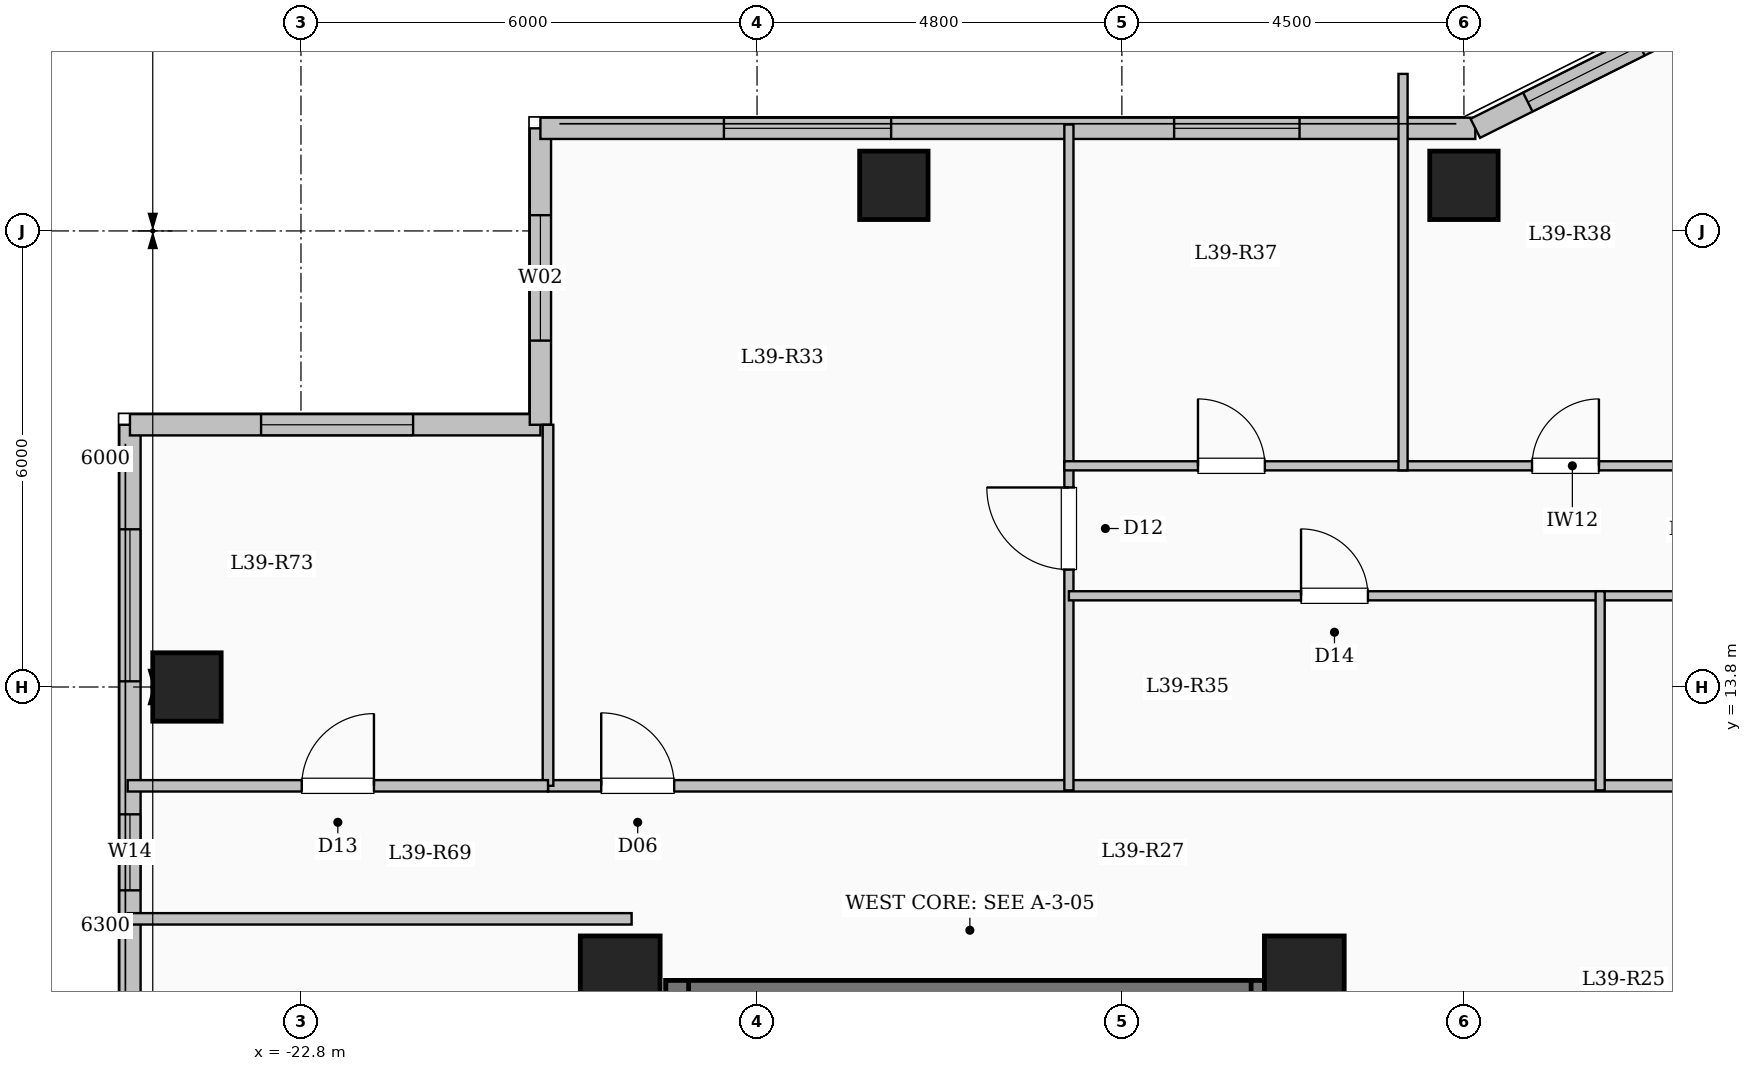
"""IFC4 building model, lengths in metres.
Left out: names, types, materials, properties, quantities, classifications, styles, units other than length and angle.
Written with IfcOpenShell. Run it as: python <this file> out.ifc"""

import sys

from ifc_helpers import new_model, si_unit, direction, frame, frame_2d, origin, origin_2d, place, context, subcontext, project, spatial, rectangle, extrude, element, fill, save


model = new_model("IFC4")
c1 = context("Model", 3, precision=1e-05, world=origin(), true_north=direction((0.0, 1.0)))
c2 = subcontext(c1, "Body", "Model", "MODEL_VIEW")
j1 = project(units=[si_unit("LENGTHUNIT", "METRE"), si_unit("PLANEANGLEUNIT", "RADIAN")], contexts=[c1])
p1 = place(None, origin())
s1 = spatial("IfcSite", under=j1, at=p1, CompositionType="ELEMENT")
p2 = place(p1, origin())
s2 = spatial("IfcBuilding", under=s1, at=p2, CompositionType="ELEMENT")
p3 = place(p2, frame((0.0, 0.0, 146.0)))
s3 = spatial("IfcBuildingStorey", under=s2, at=p3, CompositionType="ELEMENT", Elevation=146.0)
for number, where, z_axis, x_axis in (
    (1, (-9.6, 10.0, 0.0), (0.0, 0.0, 1.0), (1.0, 0.0, 0.0)),
    (2, (-18.6, 10.0, 0.0), (0.0, 0.0, 1.0), (1.0, 0.0, 0.0)),
):
    element("IfcColumn", number, at=place(p3, frame(where, z_axis=z_axis, x_axis=x_axis)), inside=s3, PredefinedType="COLUMN", context=c2, shape_type="SweptSolid", body=[
        extrude(rectangle(XDim=1.05, YDim=1.05, at=origin_2d()), origin(), (0.0, 0.0, 1.0), 3.35),
    ])
for number, where, z_axis, x_axis in (
    (3, (-15.0, 20.4, 0.0), (0.0, 0.0, 1.0), (1.0, 0.0, 0.0)),
    (4, (-7.5, 20.4, 0.0), (0.0, 0.0, 1.0), (1.0, 0.0, 0.0)),
    (5, (-24.3, 13.8, 0.0), (0.0, 0.0, 1.0), (1.0, 0.0, 0.0)),
):
    element("IfcColumn", number, at=place(p3, frame(where, z_axis=z_axis, x_axis=x_axis)), inside=s3, PredefinedType="COLUMN", context=c2, shape_type="SweptSolid", body=[
        extrude(rectangle(XDim=0.9, YDim=0.9, at=origin_2d()), origin(), (0.0, 0.0, 1.0), 3.35),
    ])
p4 = place(p3, frame((-25.05, -17.25, 0.0), z_axis=(0.0, 0.0, 1.0), x_axis=(0.0, 1.0, 0.0)))
e6 = element("IfcWall", 6, at=p4, inside=s3, PredefinedType="SOLIDWALL", context=c2, shape_type="SweptSolid", body=[
    extrude(rectangle(XDim=34.5, YDim=0.28, at=frame_2d((17.25, 0.0))), origin(), (0.0, 0.0, 1.0), 3.1),
])
p5 = place(p4, frame((2.35, 0.0, 0.9)))
e7 = element("IfcOpeningElement", 7, at=p5, cuts=e6, PredefinedType="OPENING", context=c2, shape_type="SweptSolid", body=[
    extrude(rectangle(XDim=2.2, YDim=1.75, at=frame_2d((1.1, 0.875))), frame((0.0, 0.15, 0.0), z_axis=(0.0, -1.0, 0.0), x_axis=(1.0, 0.0, 0.0)), (0.0, 0.0, 1.0), 0.3),
])
p6 = place(p4, frame((7.742, 0.0, 0.9)))
e8 = element("IfcOpeningElement", 8, at=p6, cuts=e6, PredefinedType="OPENING", context=c2, shape_type="SweptSolid", body=[
    extrude(rectangle(XDim=1.5, YDim=1.65, at=frame_2d((0.75, 0.825))), frame((0.0, 0.15, 0.0), z_axis=(0.0, -1.0, 0.0), x_axis=(1.0, 0.0, 0.0)), (0.0, 0.0, 1.0), 0.3),
])
p7 = place(p4, frame((18.0, 0.0, 0.9)))
e9 = element("IfcOpeningElement", 9, at=p7, cuts=e6, PredefinedType="OPENING", context=c2, shape_type="SweptSolid", body=[
    extrude(rectangle(XDim=2.0, YDim=1.7, at=frame_2d((1.0, 0.85))), frame((0.0, 0.15, 0.0), z_axis=(0.0, -1.0, 0.0), x_axis=(1.0, 0.0, 0.0)), (0.0, 0.0, 1.0), 0.3),
])
p8 = place(p4, frame((28.375, 0.0, 0.95)))
e10 = element("IfcOpeningElement", 10, at=p8, cuts=e6, PredefinedType="OPENING", context=c2, shape_type="SweptSolid", body=[
    extrude(rectangle(XDim=1.0, YDim=1.5, at=frame_2d((0.5, 0.75))), frame((0.0, 0.15, 0.0), z_axis=(0.0, -1.0, 0.0), x_axis=(1.0, 0.0, 0.0)), (0.0, 0.0, 1.0), 0.3),
])
p9 = place(p4, frame((31.125, 0.0, 0.9)))
e11 = element("IfcOpeningElement", 11, at=p9, cuts=e6, PredefinedType="OPENING", context=c2, shape_type="SweptSolid", body=[
    extrude(rectangle(XDim=2.0, YDim=1.7, at=frame_2d((1.0, 0.85))), frame((0.0, 0.15, 0.0), z_axis=(0.0, -1.0, 0.0), x_axis=(1.0, 0.0, 0.0)), (0.0, 0.0, 1.0), 0.3),
])
p10 = place(p3, frame((-25.05, 17.25, 0.0), z_axis=(0.0, 0.0, 1.0), x_axis=(1.0, 0.0, 0.0)))
e12 = element("IfcWall", 12, at=p10, inside=s3, PredefinedType="SOLIDWALL", context=c2, shape_type="SweptSolid", body=[
    extrude(rectangle(XDim=5.4, YDim=0.28, at=frame_2d((2.7, 0.0))), origin(), (0.0, 0.0, 1.0), 3.1),
])
p11 = place(p10, frame((1.725, 0.0, 0.9)))
e13 = element("IfcOpeningElement", 13, at=p11, cuts=e12, PredefinedType="OPENING", context=c2, shape_type="SweptSolid", body=[
    extrude(rectangle(XDim=2.0, YDim=1.7, at=frame_2d((1.0, 0.85))), frame((0.0, 0.15, 0.0), z_axis=(0.0, -1.0, 0.0), x_axis=(1.0, 0.0, 0.0)), (0.0, 0.0, 1.0), 0.3),
])
p12 = place(p3, frame((-19.65, 17.25, 0.0), z_axis=(0.0, 0.0, 1.0), x_axis=(0.0, 1.0, 0.0)))
e14 = element("IfcWall", 14, at=p12, inside=s3, PredefinedType="SOLIDWALL", context=c2, shape_type="SweptSolid", body=[
    extrude(rectangle(XDim=3.9, YDim=0.28, at=frame_2d((1.95, 0.0))), origin(), (0.0, 0.0, 1.0), 3.1),
])
p13 = place(p12, frame((1.107, 0.0, 0.9)))
e15 = element("IfcOpeningElement", 15, at=p13, cuts=e14, PredefinedType="OPENING", context=c2, shape_type="SweptSolid", body=[
    extrude(rectangle(XDim=1.65, YDim=1.6, at=frame_2d((0.825, 0.8))), frame((0.0, 0.15, 0.0), z_axis=(0.0, -1.0, 0.0), x_axis=(1.0, 0.0, 0.0)), (0.0, 0.0, 1.0), 0.3),
])
p14 = place(p3, frame((-19.65, 21.15, 0.0), z_axis=(0.0, 0.0, 1.0), x_axis=(1.0, 0.0, 0.0)))
e16 = element("IfcWall", 16, at=p14, inside=s3, PredefinedType="SOLIDWALL", context=c2, shape_type="SweptSolid", body=[
    extrude(rectangle(XDim=12.3, YDim=0.28, at=frame_2d((6.15, 0.0))), origin(), (0.0, 0.0, 1.0), 3.1),
])
p15 = place(p14, frame((2.414, 0.0, 0.9)))
e17 = element("IfcOpeningElement", 17, at=p15, cuts=e16, PredefinedType="OPENING", context=c2, shape_type="SweptSolid", body=[
    extrude(rectangle(XDim=2.2, YDim=1.75, at=frame_2d((1.1, 0.875))), frame((0.0, 0.15, 0.0), z_axis=(0.0, -1.0, 0.0), x_axis=(1.0, 0.0, 0.0)), (0.0, 0.0, 1.0), 0.3),
])
p16 = place(p14, frame((8.337, 0.0, 0.9)))
e18 = element("IfcOpeningElement", 18, at=p16, cuts=e16, PredefinedType="OPENING", context=c2, shape_type="SweptSolid", body=[
    extrude(rectangle(XDim=1.65, YDim=1.6, at=frame_2d((0.825, 0.8))), frame((0.0, 0.15, 0.0), z_axis=(0.0, -1.0, 0.0), x_axis=(1.0, 0.0, 0.0)), (0.0, 0.0, 1.0), 0.3),
])
p17 = place(p3, frame((-7.35, 21.15, 0.0), z_axis=(0.0, 0.0, 1.0), x_axis=(0.894427191, 0.4472135955, 0.0)))
e19 = element("IfcWall", 19, at=p17, inside=s3, PredefinedType="SOLIDWALL", context=c2, shape_type="SweptSolid", body=[
    extrude(rectangle(XDim=3.354, YDim=0.28, at=frame_2d((1.677, 0.0))), origin(), (0.0, 0.0, 1.0), 3.1),
])
p18 = place(p17, frame((0.772, 0.0, 0.9)))
e20 = element("IfcOpeningElement", 20, at=p18, cuts=e19, PredefinedType="OPENING", context=c2, shape_type="SweptSolid", body=[
    extrude(rectangle(XDim=1.65, YDim=1.6, at=frame_2d((0.825, 0.8))), frame((0.0, 0.15, 0.0), z_axis=(0.0, -1.0, 0.0), x_axis=(1.0, 0.0, 0.0)), (0.0, 0.0, 1.0), 0.3),
])
p19 = place(p3, frame((-18.0, 9.79, 0.0), z_axis=(0.0, 0.0, 1.0), x_axis=(1.0, 0.0, 0.0)))
e21 = element("IfcWall", 21, at=p19, inside=s3, PredefinedType="SHEAR", context=c2, shape_type="SweptSolid", body=[
    extrude(rectangle(XDim=8.0, YDim=0.3, at=frame_2d((4.0, 0.0))), origin(), (0.0, 0.0, 1.0), 3.35),
])
for number, where, z_axis, x_axis in (
    (22, (-17.85, 6.35, 0.0), (0.0, 0.0, 1.0), (0.0, 1.0, 0.0)),
    (23, (-10.15, 6.35, 0.0), (0.0, 0.0, 1.0), (0.0, 1.0, 0.0)),
):
    element("IfcWall", number, at=place(p3, frame(where, z_axis=z_axis, x_axis=x_axis)), inside=s3, PredefinedType="SHEAR", context=c2, shape_type="SweptSolid", body=[
        extrude(rectangle(XDim=3.59, YDim=0.3, at=frame_2d((1.795, 0.0))), origin(), (0.0, 0.0, 1.0), 3.35),
    ])
p20 = place(p3, frame((-19.55, 12.5, 0.0), z_axis=(0.0, 0.0, 1.0), x_axis=(1.0, 0.0, 0.0)))
e24 = element("IfcWall", 24, at=p20, inside=s3, PredefinedType="PARTITIONING", context=c2, shape_type="SweptSolid", body=[
    extrude(rectangle(XDim=15.7, YDim=0.15, at=frame_2d((7.85, 0.0))), origin(), (0.0, 0.0, 1.0), 3.1),
])
p21 = place(p20, frame((0.7, 0.0, 0.0)))
e25 = element("IfcOpeningElement", 25, at=p21, cuts=e24, PredefinedType="OPENING", context=c2, shape_type="SweptSolid", body=[
    extrude(rectangle(XDim=0.96, YDim=2.15, at=frame_2d((0.48, 1.075))), frame((0.0, 0.085, 0.0), z_axis=(0.0, -1.0, 0.0), x_axis=(1.0, 0.0, 0.0)), (0.0, 0.0, 1.0), 0.17),
])
p22 = place(p3, frame((-12.697, 12.44, 0.0), z_axis=(0.0, 0.0, 1.0), x_axis=(0.0, 1.0, 0.0)))
e26 = element("IfcWall", 26, at=p22, inside=s3, PredefinedType="PARTITIONING", context=c2, shape_type="SweptSolid", body=[
    extrude(rectangle(XDim=8.76, YDim=0.12, at=frame_2d((4.38, 0.0))), origin(), (0.0, 0.0, 1.0), 3.1),
])
p23 = place(p22, frame((2.905, 0.0, 0.0)))
e27 = element("IfcOpeningElement", 27, at=p23, cuts=e26, PredefinedType="OPENING", context=c2, shape_type="SweptSolid", body=[
    extrude(rectangle(XDim=1.08, YDim=2.15, at=frame_2d((0.54, 1.075))), frame((0.0, 0.07, 0.0), z_axis=(0.0, -1.0, 0.0), x_axis=(1.0, 0.0, 0.0)), (0.0, 0.0, 1.0), 0.14),
])
p24 = place(p3, frame((-12.697, 15.0, 0.0), z_axis=(0.0, 0.0, 1.0), x_axis=(1.0, 0.0, 0.0)))
e28 = element("IfcWall", 28, at=p24, inside=s3, PredefinedType="PARTITIONING", context=c2, shape_type="SweptSolid", body=[
    extrude(rectangle(XDim=6.989, YDim=0.12, at=frame_2d((3.495, 0.0))), origin(), (0.0, 0.0, 1.0), 3.1),
])
p25 = place(p24, frame((3.054, 0.0, 0.0)))
e29 = element("IfcOpeningElement", 29, at=p25, cuts=e28, PredefinedType="OPENING", context=c2, shape_type="SweptSolid", body=[
    extrude(rectangle(XDim=0.88, YDim=2.1, at=frame_2d((0.44, 1.05))), frame((0.0, 0.07, 0.0), z_axis=(0.0, -1.0, 0.0), x_axis=(1.0, 0.0, 0.0)), (0.0, 0.0, 1.0), 0.14),
])
p26 = place(p3, frame((-5.708, 15.0, 0.0), z_axis=(0.0, 0.0, 1.0), x_axis=(1.0, 0.0, 0.0)))
e30 = element("IfcWall", 30, at=p26, inside=s3, PredefinedType="PARTITIONING", context=c2, shape_type="SweptSolid", body=[
    extrude(rectangle(XDim=6.258, YDim=0.12, at=frame_2d((3.129, 0.0))), origin(), (0.0, 0.0, 1.0), 3.1),
])
p27 = place(p26, frame((2.689, 0.0, 0.0)))
e31 = element("IfcOpeningElement", 31, at=p27, cuts=e30, PredefinedType="OPENING", context=c2, shape_type="SweptSolid", body=[
    extrude(rectangle(XDim=0.88, YDim=2.1, at=frame_2d((0.44, 1.05))), frame((0.0, 0.07, 0.0), z_axis=(0.0, -1.0, 0.0), x_axis=(1.0, 0.0, 0.0)), (0.0, 0.0, 1.0), 0.14),
])
p28 = place(p3, frame((-12.757, 16.71, 0.0), z_axis=(0.0, 0.0, 1.0), x_axis=(1.0, 0.0, 0.0)))
e32 = element("IfcWall", 32, at=p28, inside=s3, PredefinedType="PARTITIONING", context=c2, shape_type="SweptSolid", body=[
    extrude(rectangle(XDim=13.367, YDim=0.12, at=frame_2d((6.684, 0.0))), origin(), (0.0, 0.0, 1.0), 3.1),
])
p29 = place(p28, frame((1.758, 0.0, 0.0)))
e33 = element("IfcOpeningElement", 33, at=p29, cuts=e32, PredefinedType="OPENING", context=c2, shape_type="SweptSolid", body=[
    extrude(rectangle(XDim=0.88, YDim=2.1, at=frame_2d((0.44, 1.05))), frame((0.0, 0.07, 0.0), z_axis=(0.0, -1.0, 0.0), x_axis=(1.0, 0.0, 0.0)), (0.0, 0.0, 1.0), 0.14),
])
p30 = place(p28, frame((6.153, 0.0, 0.0)))
e34 = element("IfcOpeningElement", 34, at=p30, cuts=e32, PredefinedType="OPENING", context=c2, shape_type="SweptSolid", body=[
    extrude(rectangle(XDim=0.88, YDim=2.1, at=frame_2d((0.44, 1.05))), frame((0.0, 0.07, 0.0), z_axis=(0.0, -1.0, 0.0), x_axis=(1.0, 0.0, 0.0)), (0.0, 0.0, 1.0), 0.14),
])
p31 = place(p28, frame((10.549, 0.0, 0.0)))
e35 = element("IfcOpeningElement", 35, at=p31, cuts=e32, PredefinedType="OPENING", context=c2, shape_type="SweptSolid", body=[
    extrude(rectangle(XDim=0.88, YDim=2.1, at=frame_2d((0.44, 1.05))), frame((0.0, 0.07, 0.0), z_axis=(0.0, -1.0, 0.0), x_axis=(1.0, 0.0, 0.0)), (0.0, 0.0, 1.0), 0.14),
])
p32 = place(p3, frame((-5.708, 12.44, 0.0), z_axis=(0.0, 0.0, 1.0), x_axis=(0.0, 1.0, 0.0)))
e36 = element("IfcWall", 36, at=p32, inside=s3, PredefinedType="PARTITIONING", context=c2, shape_type="SweptSolid", body=[
    extrude(rectangle(XDim=2.62, YDim=0.12, at=frame_2d((1.31, 0.0))), origin(), (0.0, 0.0, 1.0), 3.1),
])
p33 = place(p3, frame((-8.301, 16.65, 0.0), z_axis=(0.0, 0.0, 1.0), x_axis=(0.0, 1.0, 0.0)))
e37 = element("IfcWall", 37, at=p33, inside=s3, PredefinedType="PARTITIONING", context=c2, shape_type="SweptSolid", body=[
    extrude(rectangle(XDim=5.216, YDim=0.12, at=frame_2d((2.608, 0.0))), origin(), (0.0, 0.0, 1.0), 3.1),
])
p34 = place(p3, frame((-25.08, 10.75, 0.0), z_axis=(0.0, 0.0, 1.0), x_axis=(1.0, 0.0, 0.0)))
e38 = element("IfcWall", 38, at=p34, inside=s3, PredefinedType="PARTITIONING", context=c2, shape_type="SweptSolid", body=[
    extrude(rectangle(XDim=6.63, YDim=0.15, at=frame_2d((3.315, 0.0))), origin(), (0.0, 0.0, 1.0), 3.1),
])
p35 = place(p3, frame((-19.55, 12.5, 0.0), z_axis=(0.0, 0.0, 1.0), x_axis=(0.0, 1.0, 0.0)))
e39 = element("IfcWall", 39, at=p35, inside=s3, PredefinedType="PARTITIONING", context=c2, shape_type="SweptSolid", body=[
    extrude(rectangle(XDim=4.75, YDim=0.14, at=frame_2d((2.375, 0.0))), origin(), (0.0, 0.0, 1.0), 3.1),
])
p36 = place(p3, frame((-25.08, 12.5, 0.0), z_axis=(0.0, 0.0, 1.0), x_axis=(1.0, 0.0, 0.0)))
e40 = element("IfcWall", 40, at=p36, inside=s3, PredefinedType="PARTITIONING", context=c2, shape_type="SweptSolid", body=[
    extrude(rectangle(XDim=5.53, YDim=0.15, at=frame_2d((2.765, 0.0))), origin(), (0.0, 0.0, 1.0), 3.1),
])
p37 = place(p36, frame((2.29, 0.0, 0.0)))
e41 = element("IfcOpeningElement", 41, at=p37, cuts=e40, PredefinedType="OPENING", context=c2, shape_type="SweptSolid", body=[
    extrude(rectangle(XDim=0.95, YDim=2.15, at=frame_2d((0.475, 1.075))), frame((0.0, 0.085, 0.0), z_axis=(0.0, -1.0, 0.0), x_axis=(1.0, 0.0, 0.0)), (0.0, 0.0, 1.0), 0.17),
])
p38 = place(p8, origin())
e42 = element("IfcWindow", 42, at=p38, inside=s3, PartitioningType="SINGLE_PANEL", PredefinedType="WINDOW", context=c2, shape_type="SweptSolid", body=[
    extrude(rectangle(XDim=1.0, YDim=1.5, at=frame_2d((0.5, 0.75))), frame((0.0, 0.03, 0.0), z_axis=(0.0, -1.0, 0.0), x_axis=(1.0, 0.0, 0.0)), (0.0, 0.0, 1.0), 0.06),
])
fill(e10, e42)
p39 = place(p9, origin())
e43 = element("IfcWindow", 43, at=p39, inside=s3, PartitioningType="SINGLE_PANEL", PredefinedType="WINDOW", context=c2, shape_type="SweptSolid", body=[
    extrude(rectangle(XDim=2.0, YDim=1.7, at=frame_2d((1.0, 0.85))), frame((0.0, 0.03, 0.0), z_axis=(0.0, -1.0, 0.0), x_axis=(1.0, 0.0, 0.0)), (0.0, 0.0, 1.0), 0.06),
])
fill(e11, e43)
p40 = place(p11, origin())
e44 = element("IfcWindow", 44, at=p40, inside=s3, PartitioningType="SINGLE_PANEL", PredefinedType="WINDOW", context=c2, shape_type="SweptSolid", body=[
    extrude(rectangle(XDim=2.0, YDim=1.7, at=frame_2d((1.0, 0.85))), frame((0.0, 0.03, 0.0), z_axis=(0.0, -1.0, 0.0), x_axis=(1.0, 0.0, 0.0)), (0.0, 0.0, 1.0), 0.06),
])
fill(e13, e44)
p41 = place(p13, origin())
e45 = element("IfcWindow", 45, at=p41, inside=s3, PartitioningType="SINGLE_PANEL", PredefinedType="WINDOW", context=c2, shape_type="SweptSolid", body=[
    extrude(rectangle(XDim=1.65, YDim=1.6, at=frame_2d((0.825, 0.8))), frame((0.0, 0.03, 0.0), z_axis=(0.0, -1.0, 0.0), x_axis=(1.0, 0.0, 0.0)), (0.0, 0.0, 1.0), 0.06),
])
fill(e15, e45)
p42 = place(p15, origin())
e46 = element("IfcWindow", 46, at=p42, inside=s3, PartitioningType="SINGLE_PANEL", PredefinedType="WINDOW", context=c2, shape_type="SweptSolid", body=[
    extrude(rectangle(XDim=2.2, YDim=1.75, at=frame_2d((1.1, 0.875))), frame((0.0, 0.03, 0.0), z_axis=(0.0, -1.0, 0.0), x_axis=(1.0, 0.0, 0.0)), (0.0, 0.0, 1.0), 0.06),
])
fill(e17, e46)
p43 = place(p16, origin())
e47 = element("IfcWindow", 47, at=p43, inside=s3, PartitioningType="SINGLE_PANEL", PredefinedType="WINDOW", context=c2, shape_type="SweptSolid", body=[
    extrude(rectangle(XDim=1.65, YDim=1.6, at=frame_2d((0.825, 0.8))), frame((0.0, 0.03, 0.0), z_axis=(0.0, -1.0, 0.0), x_axis=(1.0, 0.0, 0.0)), (0.0, 0.0, 1.0), 0.06),
])
fill(e18, e47)
p44 = place(p18, origin())
e48 = element("IfcWindow", 48, at=p44, inside=s3, PartitioningType="SINGLE_PANEL", PredefinedType="WINDOW", context=c2, shape_type="SweptSolid", body=[
    extrude(rectangle(XDim=1.65, YDim=1.6, at=frame_2d((0.825, 0.8))), frame((0.0, 0.03, 0.0), z_axis=(0.0, -1.0, 0.0), x_axis=(1.0, 0.0, 0.0)), (0.0, 0.0, 1.0), 0.06),
])
fill(e20, e48)
p45 = place(p21, origin())
e49 = element("IfcDoor", 49, at=p45, inside=s3, OperationType="SINGLE_SWING_LEFT", PredefinedType="DOOR", context=c2, shape_type="SweptSolid", body=[
    extrude(rectangle(XDim=0.96, YDim=2.15, at=frame_2d((0.48, 1.075))), frame((0.0, 0.025, 0.0), z_axis=(0.0, -1.0, 0.0), x_axis=(1.0, 0.0, 0.0)), (0.0, 0.0, 1.0), 0.05),
])
fill(e25, e49)
p46 = place(p23, origin())
e50 = element("IfcDoor", 50, at=p46, inside=s3, OperationType="SINGLE_SWING_RIGHT", PredefinedType="DOOR", context=c2, shape_type="SweptSolid", body=[
    extrude(rectangle(XDim=1.08, YDim=2.15, at=frame_2d((0.54, 1.075))), frame((0.0, 0.025, 0.0), z_axis=(0.0, -1.0, 0.0), x_axis=(1.0, 0.0, 0.0)), (0.0, 0.0, 1.0), 0.05),
])
fill(e27, e50)
p47 = place(p25, origin())
e51 = element("IfcDoor", 51, at=p47, inside=s3, OperationType="SINGLE_SWING_LEFT", PredefinedType="DOOR", context=c2, shape_type="SweptSolid", body=[
    extrude(rectangle(XDim=0.88, YDim=2.1, at=frame_2d((0.44, 1.05))), frame((0.0, 0.025, 0.0), z_axis=(0.0, -1.0, 0.0), x_axis=(1.0, 0.0, 0.0)), (0.0, 0.0, 1.0), 0.05),
])
fill(e29, e51)
p48 = place(p29, origin())
e52 = element("IfcDoor", 52, at=p48, inside=s3, OperationType="SINGLE_SWING_LEFT", PredefinedType="DOOR", context=c2, shape_type="SweptSolid", body=[
    extrude(rectangle(XDim=0.88, YDim=2.1, at=frame_2d((0.44, 1.05))), frame((0.0, 0.025, 0.0), z_axis=(0.0, -1.0, 0.0), x_axis=(1.0, 0.0, 0.0)), (0.0, 0.0, 1.0), 0.05),
])
fill(e33, e52)
p49 = place(p30, origin())
e53 = element("IfcDoor", 53, at=p49, inside=s3, OperationType="SINGLE_SWING_RIGHT", PredefinedType="DOOR", context=c2, shape_type="SweptSolid", body=[
    extrude(rectangle(XDim=0.88, YDim=2.1, at=frame_2d((0.44, 1.05))), frame((0.0, 0.025, 0.0), z_axis=(0.0, -1.0, 0.0), x_axis=(1.0, 0.0, 0.0)), (0.0, 0.0, 1.0), 0.05),
])
fill(e34, e53)
p50 = place(p37, origin())
e54 = element("IfcDoor", 54, at=p50, inside=s3, OperationType="SINGLE_SWING_RIGHT", PredefinedType="DOOR", context=c2, shape_type="SweptSolid", body=[
    extrude(rectangle(XDim=0.95, YDim=2.15, at=frame_2d((0.475, 1.075))), frame((0.0, 0.025, 0.0), z_axis=(0.0, -1.0, 0.0), x_axis=(1.0, 0.0, 0.0)), (0.0, 0.0, 1.0), 0.05),
])
fill(e41, e54)
save(model, sys.argv[1])
